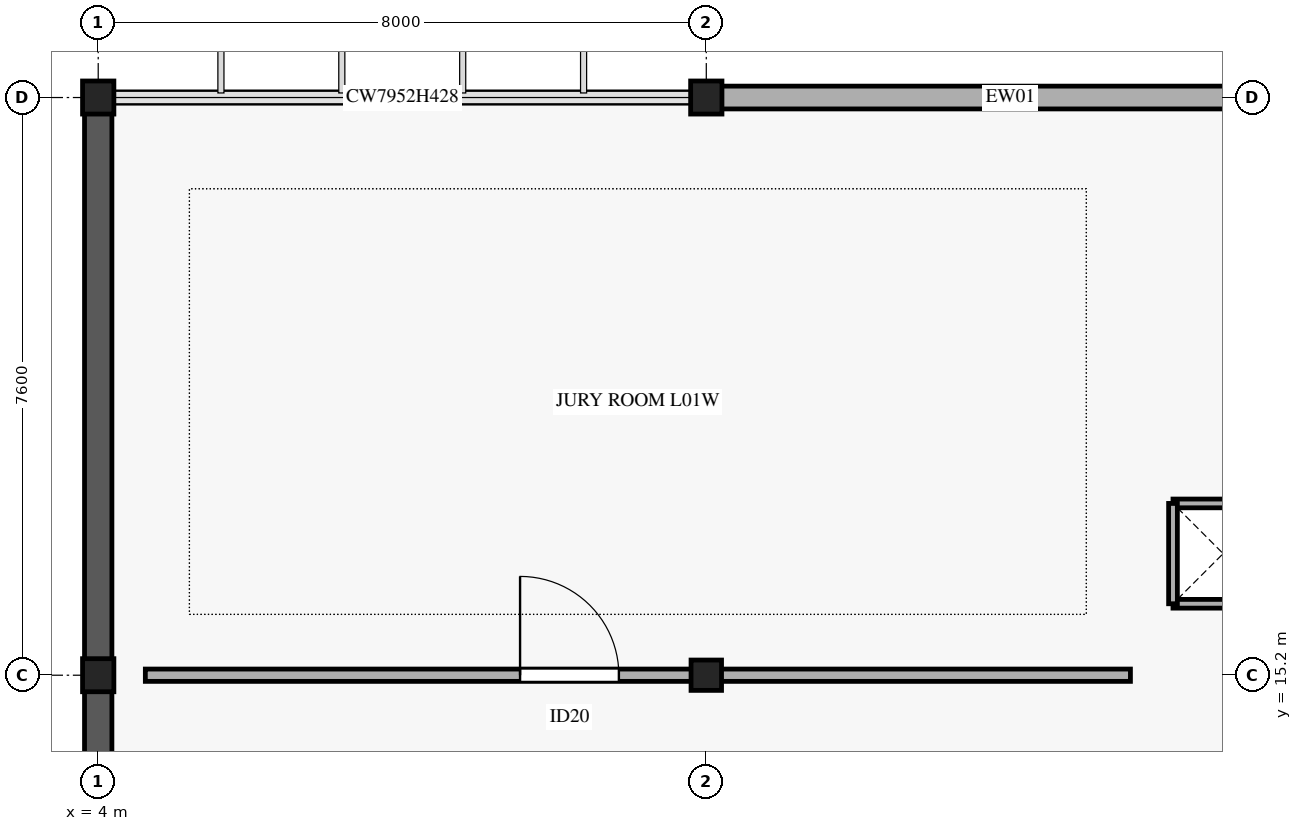
"""IFC4 building model, lengths in metres.
Left out: names, types, materials, properties, quantities, classifications, styles, units other than length and angle.
Written with IfcOpenShell. Run it as: python <this file> out.ifc"""

import sys

from ifc_helpers import new_model, si_unit, direction, frame, frame_2d, origin, origin_2d, place, context, subcontext, project, spatial, rectangle, i_section, extrude, element, fill, save


model = new_model("IFC4")
c1 = context("Model", 3, precision=1e-05, world=origin(), true_north=direction((0.0, 1.0)))
c2 = subcontext(c1, "Body", "Model", "MODEL_VIEW")
j1 = project(units=[si_unit("LENGTHUNIT", "METRE"), si_unit("PLANEANGLEUNIT", "RADIAN")], contexts=[c1])
p1 = place(None, origin())
s1 = spatial("IfcSite", under=j1, at=p1, CompositionType="ELEMENT")
p2 = place(p1, origin())
s2 = spatial("IfcBuilding", under=s1, at=p2, CompositionType="ELEMENT")
p3 = place(p2, frame((0.0, 0.0, 5.4)))
s3 = spatial("IfcBuildingStorey", under=s2, at=p3, CompositionType="ELEMENT", Elevation=5.4)
for number, where, z_axis, x_axis in (
    (1, (4.0, 15.2, 0.0), (0.0, 0.0, 1.0), (1.0, 0.0, 0.0)),
    (2, (4.0, 22.8, 0.0), (0.0, 0.0, 1.0), (1.0, 0.0, 0.0)),
):
    element("IfcColumn", number, at=place(p3, frame(where, z_axis=z_axis, x_axis=x_axis)), inside=s3, PredefinedType="COLUMN", context=c2, shape_type="SweptSolid", body=[
        extrude(i_section(OverallWidth=0.412, OverallDepth=0.435, WebThickness=0.036, FlangeThickness=0.057, FilletRadius=0.015, at=origin_2d()), origin(), (0.0, 0.0, 1.0), 5.185),
    ])
p4 = place(p3, frame((12.0, 15.2, 0.0), z_axis=(0.0, 0.0, 1.0), x_axis=(1.0, 0.0, 0.0)))
e3 = element("IfcColumn", 3, at=p4, inside=s3, PredefinedType="COLUMN", context=c2, shape_type="SweptSolid", body=[
    extrude(i_section(OverallWidth=0.401, OverallDepth=0.399, WebThickness=0.025, FlangeThickness=0.04, FilletRadius=0.015, at=origin_2d()), origin(), (0.0, 0.0, 1.0), 5.185),
])
p5 = place(p3, frame((12.0, 22.8, 0.0), z_axis=(0.0, 0.0, 1.0), x_axis=(1.0, 0.0, 0.0)))
e4 = element("IfcColumn", 4, at=p5, inside=s3, PredefinedType="COLUMN", context=c2, shape_type="SweptSolid", body=[
    extrude(i_section(OverallWidth=0.412, OverallDepth=0.435, WebThickness=0.036, FlangeThickness=0.057, FilletRadius=0.015, at=origin_2d()), origin(), (0.0, 0.0, 1.0), 5.185),
])
p6 = place(p3, frame((4.0, 7.58, 0.0), z_axis=(0.0, 0.0, 1.0), x_axis=(0.0, 1.0, 0.0)))
e5 = element("IfcWall", 5, at=p6, inside=s3, PredefinedType="STANDARD", context=c2, shape_type="SweptSolid", body=[
    extrude(rectangle(XDim=7.64, YDim=0.36, at=frame_2d((3.82, 0.0))), origin(), (0.0, 0.0, 1.0), 5.19),
])
p7 = place(p3, frame((4.0, 15.18, 0.0), z_axis=(0.0, 0.0, 1.0), x_axis=(0.0, 1.0, 0.0)))
e6 = element("IfcWall", 6, at=p7, inside=s3, PredefinedType="STANDARD", context=c2, shape_type="SweptSolid", body=[
    extrude(rectangle(XDim=7.64, YDim=0.36, at=frame_2d((3.82, 0.0))), origin(), (0.0, 0.0, 1.0), 5.19),
])
p8 = place(p3, frame((11.98, 22.8, 0.0), z_axis=(0.0, 0.0, 1.0), x_axis=(1.0, 0.0, 0.0)))
e7 = element("IfcWall", 7, at=p8, inside=s3, PredefinedType="STANDARD", context=c2, shape_type="SweptSolid", body=[
    extrude(rectangle(XDim=8.04, YDim=0.3, at=frame_2d((4.02, 0.0))), origin(), (0.0, 0.0, 1.0), 4.25),
])
for number, where, z_axis, x_axis in (
    (8, (18.14, 16.14, 0.0), (0.0, 0.0, 1.0), (1.0, 0.0, 0.0)),
    (9, (19.46, 17.46, 0.0), (0.0, 0.0, 1.0), (-1.0, 0.0, 0.0)),
    (10, (18.14, 17.46, 0.0), (0.0, 0.0, 1.0), (0.0, -1.0, 0.0)),
):
    element("IfcWall", number, at=place(p3, frame(where, z_axis=z_axis, x_axis=x_axis)), inside=s3, PredefinedType="PARTITIONING", context=c2, shape_type="SweptSolid", body=[
        extrude(rectangle(XDim=1.32, YDim=0.115, at=frame_2d((0.66, 0.0))), origin(), (0.0, 0.0, 1.0), 4.35),
    ])
p9 = place(p3, frame((4.62, 15.2, 0.0), z_axis=(0.0, 0.0, 1.0), x_axis=(1.0, 0.0, 0.0)))
e11 = element("IfcWall", 11, at=p9, inside=s3, PredefinedType="PARTITIONING", context=c2, shape_type="SweptSolid", body=[
    extrude(rectangle(XDim=12.96, YDim=0.162, at=frame_2d((6.48, 0.0))), origin(), (0.0, 0.0, 1.0), 4.05),
])
p10 = place(p9, frame((4.93, 0.0, 0.0)))
e12 = element("IfcOpeningElement", 12, at=p10, cuts=e11, PredefinedType="OPENING", context=c2, shape_type="SweptSolid", body=[
    extrude(rectangle(XDim=1.3, YDim=2.2, at=frame_2d((0.65, 1.1))), frame((0.0, 0.091, 0.0), z_axis=(0.0, -1.0, 0.0), x_axis=(1.0, 0.0, 0.0)), (0.0, 0.0, 1.0), 0.182),
])
p11 = place(p10, origin())
e13 = element("IfcDoor", 13, at=p11, inside=s3, OperationType="SINGLE_SWING_LEFT", PredefinedType="DOOR", context=c2, shape_type="SweptSolid", body=[
    extrude(rectangle(XDim=1.3, YDim=2.2, at=frame_2d((0.65, 1.1))), frame((0.0, 0.025, 0.0), z_axis=(0.0, -1.0, 0.0), x_axis=(1.0, 0.0, 0.0)), (0.0, 0.0, 1.0), 0.05),
])
fill(e12, e13)
save(model, sys.argv[1])
